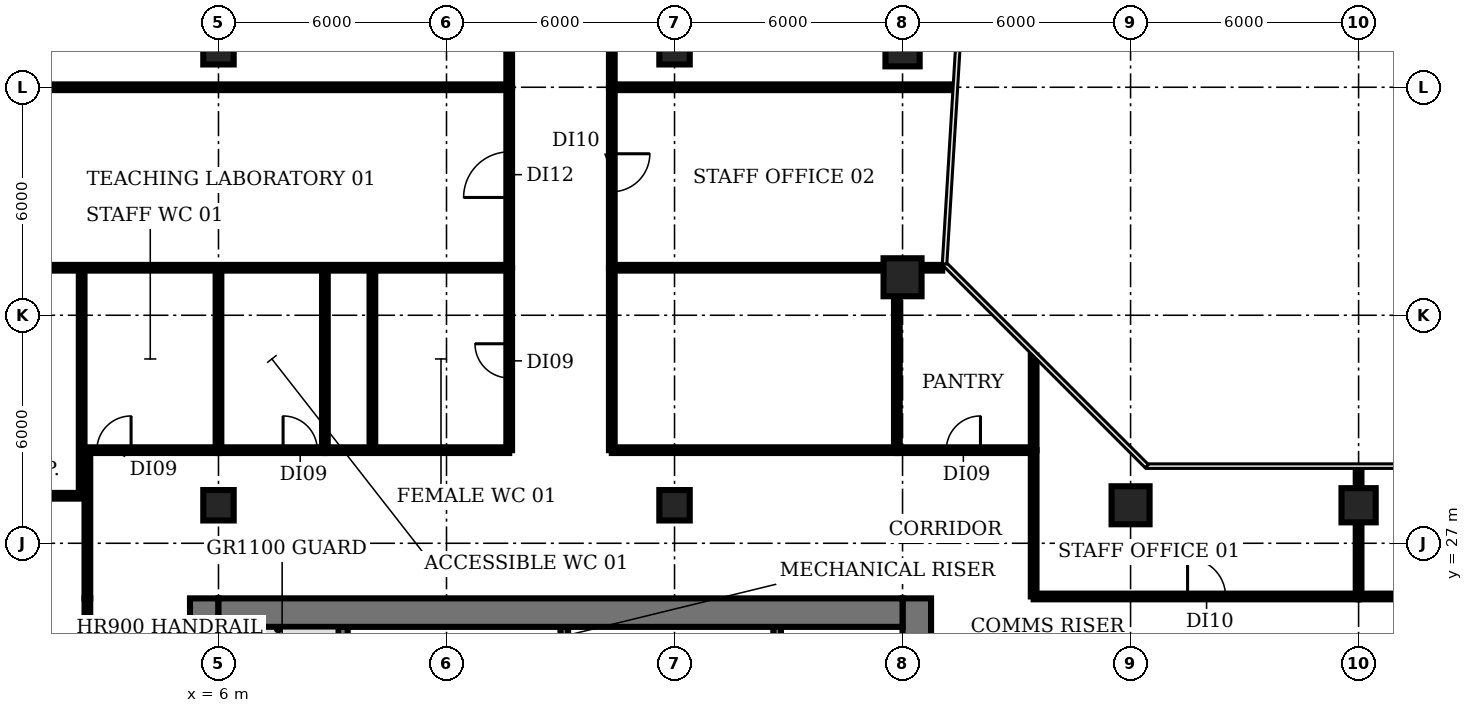
"""IFC4 building model, lengths in metres.
Left out: names, types, materials, properties, quantities, classifications, styles, units other than length and angle.
Written with IfcOpenShell. Run it as: python <this file> out.ifc"""

import sys

from ifc_helpers import new_model, si_unit, direction, frame, frame_2d, origin, origin_2d, place, context, subcontext, project, spatial, rectangle, circle, extrude, element, fill, save


model = new_model("IFC4")
c1 = context("Model", 3, precision=1e-05, world=origin(), true_north=direction((0.0, 1.0)))
c2 = subcontext(c1, "Body", "Model", "MODEL_VIEW")
j1 = project(units=[si_unit("LENGTHUNIT", "METRE"), si_unit("PLANEANGLEUNIT", "RADIAN")], contexts=[c1])
p1 = place(None, origin())
s1 = spatial("IfcSite", under=j1, at=p1, CompositionType="ELEMENT")
p2 = place(p1, origin())
s2 = spatial("IfcBuilding", under=s1, at=p2, CompositionType="ELEMENT")
p3 = place(p2, frame((0.0, 0.0, 125.6)))
s3 = spatial("IfcBuildingStorey", under=s2, at=p3, CompositionType="ELEMENT", Elevation=125.6)
for number, where, z_axis, x_axis in (
    (1, (6.0, 28.0, 0.0), (0.0, 0.0, 1.0), (1.0, 0.0, 0.0)),
    (2, (6.0, 40.0, 0.0), (0.0, 0.0, 1.0), (1.0, 0.0, 0.0)),
    (3, (18.0, 28.0, 0.0), (0.0, 0.0, 1.0), (1.0, 0.0, 0.0)),
    (4, (18.0, 40.0, 0.0), (0.0, 0.0, 1.0), (1.0, 0.0, 0.0)),
):
    element("IfcColumn", number, at=place(p3, frame(where, z_axis=z_axis, x_axis=x_axis)), inside=s3, PredefinedType="COLUMN", context=c2, shape_type="SweptSolid", body=[
        extrude(rectangle(XDim=0.8, YDim=0.8, at=origin_2d()), origin(), (0.0, 0.0, 1.0), 3.85),
    ])
p4 = place(p3, frame((24.0, 34.0, 0.0), z_axis=(0.0, 0.0, 1.0), x_axis=(1.0, 0.0, 0.0)))
e5 = element("IfcColumn", 5, at=p4, inside=s3, PredefinedType="COLUMN", context=c2, shape_type="SweptSolid", body=[
    extrude(circle(Radius=0.5, at=origin_2d()), origin(), (0.0, 0.0, 1.0), 3.85),
])
p5 = place(p3, frame((24.0, 40.0, 0.0), z_axis=(0.0, 0.0, 1.0), x_axis=(1.0, 0.0, 0.0)))
e6 = element("IfcColumn", 6, at=p5, inside=s3, PredefinedType="COLUMN", context=c2, shape_type="SweptSolid", body=[
    extrude(rectangle(XDim=0.9, YDim=0.9, at=origin_2d()), origin(), (0.0, 0.0, 1.0), 3.85),
])
p6 = place(p3, frame((30.0, 28.0, 0.0), z_axis=(0.0, 0.0, 1.0), x_axis=(1.0, 0.0, 0.0)))
e7 = element("IfcColumn", 7, at=p6, inside=s3, PredefinedType="COLUMN", context=c2, shape_type="SweptSolid", body=[
    extrude(circle(Radius=0.5, at=origin_2d()), origin(), (0.0, 0.0, 1.0), 3.85),
])
p7 = place(p3, frame((36.0, 28.0, 0.0), z_axis=(0.0, 0.0, 1.0), x_axis=(1.0, 0.0, 0.0)))
e8 = element("IfcColumn", 8, at=p7, inside=s3, PredefinedType="COLUMN", context=c2, shape_type="SweptSolid", body=[
    extrude(rectangle(XDim=0.9, YDim=0.9, at=origin_2d()), origin(), (0.0, 0.0, 1.0), 3.85),
])
p8 = place(p3, frame((9.275, 18.375, 0.0), z_axis=(0.0, 0.0, 1.0), x_axis=(0.0, 1.0, 0.0)))
e9 = element("IfcWall", 9, at=p8, inside=s3, PredefinedType="SHEAR", context=c2, shape_type="SweptSolid", body=[
    extrude(rectangle(XDim=6.425, YDim=0.25, at=frame_2d((3.212, 0.0))), origin(), (0.0, 0.0, 1.0), 3.85),
])
for number, where, z_axis, x_axis in (
    (10, (15.1, 22.9, 0.0), (0.0, 0.0, 1.0), (0.0, 1.0, 0.0)),
    (11, (20.7, 22.9, 0.0), (0.0, 0.0, 1.0), (0.0, 1.0, 0.0)),
):
    element("IfcWall", number, at=place(p3, frame(where, z_axis=z_axis, x_axis=x_axis)), inside=s3, PredefinedType="SHEAR", context=c2, shape_type="SweptSolid", body=[
        extrude(rectangle(XDim=1.9, YDim=0.2, at=frame_2d((0.95, 0.0))), origin(), (0.0, 0.0, 1.0), 3.85),
    ])
p9 = place(p3, frame((5.625, 4.47, 0.0), z_axis=(0.0, 0.0, 1.0), x_axis=(0.0, 1.0, 0.0)))
e12 = element("IfcWall", 12, at=p9, inside=s3, PredefinedType="SHEAR", context=c2, shape_type="SweptSolid", body=[
    extrude(rectangle(XDim=21.08, YDim=0.75, at=frame_2d((10.54, 0.0))), origin(), (0.0, 0.0, 1.0), 3.85),
])
p10 = place(p9, frame((1.18, 0.0, 0.0)))
e13 = element("IfcOpeningElement", 13, at=p10, cuts=e12, PredefinedType="OPENING", context=c2, shape_type="SweptSolid", body=[
    extrude(rectangle(XDim=1.5, YDim=2.1, at=frame_2d((0.75, 1.05))), frame((0.0, 0.385, 0.0), z_axis=(0.0, -1.0, 0.0), x_axis=(1.0, 0.0, 0.0)), (0.0, 0.0, 1.0), 0.77),
])
p11 = place(p9, frame((7.63, 0.0, 0.0)))
e14 = element("IfcOpeningElement", 14, at=p11, cuts=e12, PredefinedType="OPENING", context=c2, shape_type="SweptSolid", body=[
    extrude(rectangle(XDim=1.2, YDim=2.1, at=frame_2d((0.6, 1.05))), frame((0.0, 0.385, 0.0), z_axis=(0.0, -1.0, 0.0), x_axis=(1.0, 0.0, 0.0)), (0.0, 0.0, 1.0), 0.77),
])
p12 = place(p9, frame((14.18, 0.0, 0.0)))
e15 = element("IfcOpeningElement", 15, at=p12, cuts=e12, PredefinedType="OPENING", context=c2, shape_type="SweptSolid", body=[
    extrude(rectangle(XDim=1.2, YDim=2.1, at=frame_2d((0.6, 1.05))), frame((0.0, 0.385, 0.0), z_axis=(0.0, -1.0, 0.0), x_axis=(1.0, 0.0, 0.0)), (0.0, 0.0, 1.0), 0.77),
])
p13 = place(p3, frame((24.375, 25.55, 0.0), z_axis=(0.0, 0.0, 1.0), x_axis=(0.0, -1.0, 0.0)))
e16 = element("IfcWall", 16, at=p13, inside=s3, PredefinedType="SHEAR", context=c2, shape_type="SweptSolid", body=[
    extrude(rectangle(XDim=21.13, YDim=0.75, at=frame_2d((10.565, 0.0))), origin(), (0.0, 0.0, 1.0), 3.85),
])
p14 = place(p13, frame((18.4, 0.0, 0.0)))
e17 = element("IfcOpeningElement", 17, at=p14, cuts=e16, PredefinedType="OPENING", context=c2, shape_type="SweptSolid", body=[
    extrude(rectangle(XDim=1.5, YDim=2.1, at=frame_2d((0.75, 1.05))), frame((0.0, 0.385, 0.0), z_axis=(0.0, -1.0, 0.0), x_axis=(1.0, 0.0, 0.0)), (0.0, 0.0, 1.0), 0.77),
])
p15 = place(p13, frame((12.3, 0.0, 0.0)))
e18 = element("IfcOpeningElement", 18, at=p15, cuts=e16, PredefinedType="OPENING", context=c2, shape_type="SweptSolid", body=[
    extrude(rectangle(XDim=0.9, YDim=2.1, at=frame_2d((0.45, 1.05))), frame((0.0, 0.385, 0.0), z_axis=(0.0, -1.0, 0.0), x_axis=(1.0, 0.0, 0.0)), (0.0, 0.0, 1.0), 0.77),
])
p16 = place(p13, frame((6.3, 0.0, 0.0)))
e19 = element("IfcOpeningElement", 19, at=p16, cuts=e16, PredefinedType="OPENING", context=c2, shape_type="SweptSolid", body=[
    extrude(rectangle(XDim=2.0, YDim=2.1, at=frame_2d((1.0, 1.05))), frame((0.0, 0.385, 0.0), z_axis=(0.0, -1.0, 0.0), x_axis=(1.0, 0.0, 0.0)), (0.0, 0.0, 1.0), 0.77),
])
p17 = place(p3, frame((6.0, 25.175, 0.0), z_axis=(0.0, 0.0, 1.0), x_axis=(1.0, 0.0, 0.0)))
e20 = element("IfcWall", 20, at=p17, inside=s3, PredefinedType="SHEAR", context=c2, shape_type="SweptSolid", body=[
    extrude(rectangle(XDim=18.0, YDim=0.75, at=frame_2d((9.0, 0.0))), origin(), (0.0, 0.0, 1.0), 3.85),
])
p18 = place(p3, frame((-1.314, 28.25, 0.0), z_axis=(0.0, 0.0, 1.0), x_axis=(1.0, 0.0, 0.0)))
e21 = element("IfcWall", 21, at=p18, inside=s3, PredefinedType="PARTITIONING", context=c2, shape_type="SweptSolid", body=[
    extrude(rectangle(XDim=3.714, YDim=0.15, at=frame_2d((1.857, 0.0))), origin(), (0.0, 0.0, 1.0), 2.83),
])
for number, where, z_axis, x_axis in (
    (22, (-0.98, 34.25, 0.0), (0.0, 0.0, 1.0), (1.0, 0.0, 0.0)),
    (23, (-0.98, 39.0, 0.0), (0.0, 0.0, 1.0), (1.0, 0.0, 0.0)),
):
    element("IfcWall", number, at=place(p3, frame(where, z_axis=z_axis, x_axis=x_axis)), inside=s3, PredefinedType="PARTITIONING", context=c2, shape_type="SweptSolid", body=[
        extrude(rectangle(XDim=14.63, YDim=0.15, at=frame_2d((7.315, 0.0))), origin(), (0.0, 0.0, 1.0), 2.83),
    ])
p19 = place(p3, frame((2.4, 28.25, 0.0), z_axis=(0.0, 0.0, 1.0), x_axis=(0.0, 1.0, 0.0)))
e24 = element("IfcWall", 24, at=p19, inside=s3, PredefinedType="PARTITIONING", context=c2, shape_type="SweptSolid", body=[
    extrude(rectangle(XDim=6.0, YDim=0.15, at=frame_2d((3.0, 0.0))), origin(), (0.0, 0.0, 1.0), 2.83),
])
p20 = place(p3, frame((2.55, 6.1, 0.0), z_axis=(0.0, 0.0, 1.0), x_axis=(0.0, 1.0, 0.0)))
e25 = element("IfcWall", 25, at=p20, inside=s3, PredefinedType="PARTITIONING", context=c2, shape_type="SweptSolid", body=[
    extrude(rectangle(XDim=19.45, YDim=0.15, at=frame_2d((9.725, 0.0))), origin(), (0.0, 0.0, 1.0), 2.83),
])
p21 = place(p20, frame((7.55, 0.0, 0.0)))
e26 = element("IfcOpeningElement", 26, at=p21, cuts=e25, PredefinedType="OPENING", context=c2, shape_type="SweptSolid", body=[
    extrude(rectangle(XDim=1.2, YDim=2.1, at=frame_2d((0.6, 1.05))), frame((0.0, 0.085, 0.0), z_axis=(0.0, -1.0, 0.0), x_axis=(1.0, 0.0, 0.0)), (0.0, 0.0, 1.0), 0.17),
])
p22 = place(p3, frame((2.55, 25.55, 0.0), z_axis=(0.0, 0.0, 1.0), x_axis=(0.0, 1.0, 0.0)))
e27 = element("IfcWall", 27, at=p22, inside=s3, PredefinedType="PARTITIONING", context=c2, shape_type="SweptSolid", body=[
    extrude(rectangle(XDim=3.9, YDim=0.15, at=frame_2d((1.95, 0.0))), origin(), (0.0, 0.0, 1.0), 2.83),
])
p23 = place(p3, frame((2.55, 29.45, 0.0), z_axis=(0.0, 0.0, 1.0), x_axis=(1.0, 0.0, 0.0)))
e28 = element("IfcWall", 28, at=p23, inside=s3, PredefinedType="PARTITIONING", context=c2, shape_type="SweptSolid", body=[
    extrude(rectangle(XDim=3.45, YDim=0.15, at=frame_2d((1.725, 0.0))), origin(), (0.0, 0.0, 1.0), 2.83),
])
p24 = place(p23, frame((0.25, 0.0, 0.0)))
e29 = element("IfcOpeningElement", 29, at=p24, cuts=e28, PredefinedType="OPENING", context=c2, shape_type="SweptSolid", body=[
    extrude(rectangle(XDim=0.9, YDim=2.1, at=frame_2d((0.45, 1.05))), frame((0.0, 0.085, 0.0), z_axis=(0.0, -1.0, 0.0), x_axis=(1.0, 0.0, 0.0)), (0.0, 0.0, 1.0), 0.17),
])
p25 = place(p3, frame((6.0, 29.45, 0.0), z_axis=(0.0, 0.0, 1.0), x_axis=(0.0, 1.0, 0.0)))
e30 = element("IfcWall", 30, at=p25, inside=s3, PredefinedType="PARTITIONING", context=c2, shape_type="SweptSolid", body=[
    extrude(rectangle(XDim=4.8, YDim=0.15, at=frame_2d((2.4, 0.0))), origin(), (0.0, 0.0, 1.0), 2.83),
])
p26 = place(p3, frame((6.0, 29.45, 0.0), z_axis=(0.0, 0.0, 1.0), x_axis=(1.0, 0.0, 0.0)))
e31 = element("IfcWall", 31, at=p26, inside=s3, PredefinedType="PARTITIONING", context=c2, shape_type="SweptSolid", body=[
    extrude(rectangle(XDim=2.8, YDim=0.15, at=frame_2d((1.4, 0.0))), origin(), (0.0, 0.0, 1.0), 2.83),
])
p27 = place(p26, frame((1.7, 0.0, 0.0)))
e32 = element("IfcOpeningElement", 32, at=p27, cuts=e31, PredefinedType="OPENING", context=c2, shape_type="SweptSolid", body=[
    extrude(rectangle(XDim=0.9, YDim=2.1, at=frame_2d((0.45, 1.05))), frame((0.0, 0.085, 0.0), z_axis=(0.0, -1.0, 0.0), x_axis=(1.0, 0.0, 0.0)), (0.0, 0.0, 1.0), 0.17),
])
p28 = place(p3, frame((8.8, 29.45, 0.0), z_axis=(0.0, 0.0, 1.0), x_axis=(0.0, 1.0, 0.0)))
e33 = element("IfcWall", 33, at=p28, inside=s3, PredefinedType="PARTITIONING", context=c2, shape_type="SweptSolid", body=[
    extrude(rectangle(XDim=4.8, YDim=0.15, at=frame_2d((2.4, 0.0))), origin(), (0.0, 0.0, 1.0), 2.83),
])
p29 = place(p3, frame((8.8, 29.45, 0.0), z_axis=(0.0, 0.0, 1.0), x_axis=(1.0, 0.0, 0.0)))
e34 = element("IfcWall", 34, at=p29, inside=s3, PredefinedType="PARTITIONING", context=c2, shape_type="SweptSolid", body=[
    extrude(rectangle(XDim=4.85, YDim=0.15, at=frame_2d((2.425, 0.0))), origin(), (0.0, 0.0, 1.0), 2.83),
])
p30 = place(p3, frame((10.05, 29.45, 0.0), z_axis=(0.0, 0.0, 1.0), x_axis=(0.0, 1.0, 0.0)))
e35 = element("IfcWall", 35, at=p30, inside=s3, PredefinedType="PARTITIONING", context=c2, shape_type="SweptSolid", body=[
    extrude(rectangle(XDim=4.8, YDim=0.15, at=frame_2d((2.4, 0.0))), origin(), (0.0, 0.0, 1.0), 2.83),
])
p31 = place(p3, frame((13.65, 29.45, 0.0), z_axis=(0.0, 0.0, 1.0), x_axis=(0.0, 1.0, 0.0)))
e36 = element("IfcWall", 36, at=p31, inside=s3, PredefinedType="PARTITIONING", context=c2, shape_type="SweptSolid", body=[
    extrude(rectangle(XDim=4.8, YDim=0.15, at=frame_2d((2.4, 0.0))), origin(), (0.0, 0.0, 1.0), 2.83),
])
p32 = place(p31, frame((1.9, 0.0, 0.0)))
e37 = element("IfcOpeningElement", 37, at=p32, cuts=e36, PredefinedType="OPENING", context=c2, shape_type="SweptSolid", body=[
    extrude(rectangle(XDim=0.9, YDim=2.1, at=frame_2d((0.45, 1.05))), frame((0.0, 0.085, 0.0), z_axis=(0.0, -1.0, 0.0), x_axis=(1.0, 0.0, 0.0)), (0.0, 0.0, 1.0), 0.17),
])
p33 = place(p3, frame((13.65, 34.25, 0.0), z_axis=(0.0, 0.0, 1.0), x_axis=(0.0, 1.0, 0.0)))
e38 = element("IfcWall", 38, at=p33, inside=s3, PredefinedType="PARTITIONING", context=c2, shape_type="SweptSolid", body=[
    extrude(rectangle(XDim=4.75, YDim=0.15, at=frame_2d((2.375, 0.0))), origin(), (0.0, 0.0, 1.0), 2.83),
])
p34 = place(p33, frame((1.85, 0.0, 0.0)))
e39 = element("IfcOpeningElement", 39, at=p34, cuts=e38, PredefinedType="OPENING", context=c2, shape_type="SweptSolid", body=[
    extrude(rectangle(XDim=1.2, YDim=2.1, at=frame_2d((0.6, 1.05))), frame((0.0, 0.085, 0.0), z_axis=(0.0, -1.0, 0.0), x_axis=(1.0, 0.0, 0.0)), (0.0, 0.0, 1.0), 0.17),
])
p35 = place(p3, frame((13.65, 39.0, 0.0), z_axis=(0.0, 0.0, 1.0), x_axis=(0.0, 1.0, 0.0)))
e40 = element("IfcWall", 40, at=p35, inside=s3, PredefinedType="PARTITIONING", context=c2, shape_type="SweptSolid", body=[
    extrude(rectangle(XDim=6.0, YDim=0.15, at=frame_2d((3.0, 0.0))), origin(), (0.0, 0.0, 1.0), 2.83),
])
p36 = place(p35, frame((2.4, 0.0, 0.0)))
e41 = element("IfcOpeningElement", 41, at=p36, cuts=e40, PredefinedType="OPENING", context=c2, shape_type="SweptSolid", body=[
    extrude(rectangle(XDim=1.0, YDim=2.1, at=frame_2d((0.5, 1.05))), frame((0.0, 0.085, 0.0), z_axis=(0.0, -1.0, 0.0), x_axis=(1.0, 0.0, 0.0)), (0.0, 0.0, 1.0), 0.17),
])
p37 = place(p3, frame((16.35, 29.45, 0.0), z_axis=(0.0, 0.0, 1.0), x_axis=(0.0, 1.0, 0.0)))
e42 = element("IfcWall", 42, at=p37, inside=s3, PredefinedType="PARTITIONING", context=c2, shape_type="SweptSolid", body=[
    extrude(rectangle(XDim=4.8, YDim=0.15, at=frame_2d((2.4, 0.0))), origin(), (0.0, 0.0, 1.0), 2.83),
])
p38 = place(p3, frame((16.35, 29.45, 0.0), z_axis=(0.0, 0.0, 1.0), x_axis=(1.0, 0.0, 0.0)))
e43 = element("IfcWall", 43, at=p38, inside=s3, PredefinedType="PARTITIONING", context=c2, shape_type="SweptSolid", body=[
    extrude(rectangle(XDim=7.5, YDim=0.15, at=frame_2d((3.75, 0.0))), origin(), (0.0, 0.0, 1.0), 2.83),
])
p39 = place(p3, frame((16.35, 34.25, 0.0), z_axis=(0.0, 0.0, 1.0), x_axis=(1.0, 0.0, 0.0)))
e44 = element("IfcWall", 44, at=p39, inside=s3, PredefinedType="PARTITIONING", context=c2, shape_type="SweptSolid", body=[
    extrude(rectangle(XDim=8.693, YDim=0.15, at=frame_2d((4.346, 0.0))), origin(), (0.0, 0.0, 1.0), 2.83),
])
p40 = place(p3, frame((16.35, 39.0, 0.0), z_axis=(0.0, 0.0, 1.0), x_axis=(0.0, -1.0, 0.0)))
e45 = element("IfcWall", 45, at=p40, inside=s3, PredefinedType="PARTITIONING", context=c2, shape_type="SweptSolid", body=[
    extrude(rectangle(XDim=4.75, YDim=0.15, at=frame_2d((2.375, 0.0))), origin(), (0.0, 0.0, 1.0), 2.83),
])
p41 = place(p40, frame((1.75, 0.0, 0.0)))
e46 = element("IfcOpeningElement", 46, at=p41, cuts=e45, PredefinedType="OPENING", context=c2, shape_type="SweptSolid", body=[
    extrude(rectangle(XDim=1.0, YDim=2.1, at=frame_2d((0.5, 1.05))), frame((0.0, 0.085, 0.0), z_axis=(0.0, -1.0, 0.0), x_axis=(1.0, 0.0, 0.0)), (0.0, 0.0, 1.0), 0.17),
])
p42 = place(p3, frame((16.35, 39.0, 0.0), z_axis=(0.0, 0.0, 1.0), x_axis=(1.0, 0.0, 0.0)))
e47 = element("IfcWall", 47, at=p42, inside=s3, PredefinedType="PARTITIONING", context=c2, shape_type="SweptSolid", body=[
    extrude(rectangle(XDim=8.99, YDim=0.15, at=frame_2d((4.495, 0.0))), origin(), (0.0, 0.0, 1.0), 2.83),
])
p43 = place(p3, frame((16.35, 57.0, 0.0), z_axis=(0.0, 0.0, 1.0), x_axis=(0.0, -1.0, 0.0)))
e48 = element("IfcWall", 48, at=p43, inside=s3, PredefinedType="PARTITIONING", context=c2, shape_type="SweptSolid", body=[
    extrude(rectangle(XDim=18.0, YDim=0.15, at=frame_2d((9.0, 0.0))), origin(), (0.0, 0.0, 1.0), 2.83),
])
p44 = place(p43, frame((8.5, 0.0, 0.0)))
e49 = element("IfcOpeningElement", 49, at=p44, cuts=e48, PredefinedType="OPENING", context=c2, shape_type="SweptSolid", body=[
    extrude(rectangle(XDim=1.2, YDim=2.1, at=frame_2d((0.6, 1.05))), frame((0.0, 0.085, 0.0), z_axis=(0.0, -1.0, 0.0), x_axis=(1.0, 0.0, 0.0)), (0.0, 0.0, 1.0), 0.17),
])
p45 = place(p3, frame((23.85, 29.45, 0.0), z_axis=(0.0, 0.0, 1.0), x_axis=(0.0, 1.0, 0.0)))
e50 = element("IfcWall", 50, at=p45, inside=s3, PredefinedType="PARTITIONING", context=c2, shape_type="SweptSolid", body=[
    extrude(rectangle(XDim=4.8, YDim=0.15, at=frame_2d((2.4, 0.0))), origin(), (0.0, 0.0, 1.0), 2.83),
])
p46 = place(p3, frame((23.85, 29.45, 0.0), z_axis=(0.0, 0.0, 1.0), x_axis=(1.0, 0.0, 0.0)))
e51 = element("IfcWall", 51, at=p46, inside=s3, PredefinedType="PARTITIONING", context=c2, shape_type="SweptSolid", body=[
    extrude(rectangle(XDim=3.6, YDim=0.15, at=frame_2d((1.8, 0.0))), origin(), (0.0, 0.0, 1.0), 2.83),
])
p47 = place(p46, frame((1.3, 0.0, 0.0)))
e52 = element("IfcOpeningElement", 52, at=p47, cuts=e51, PredefinedType="OPENING", context=c2, shape_type="SweptSolid", body=[
    extrude(rectangle(XDim=0.9, YDim=2.1, at=frame_2d((0.45, 1.05))), frame((0.0, 0.085, 0.0), z_axis=(0.0, -1.0, 0.0), x_axis=(1.0, 0.0, 0.0)), (0.0, 0.0, 1.0), 0.17),
])
p48 = place(p3, frame((27.45, 25.6, 0.0), z_axis=(0.0, 0.0, 1.0), x_axis=(0.0, 1.0, 0.0)))
e53 = element("IfcWall", 53, at=p48, inside=s3, PredefinedType="PARTITIONING", context=c2, shape_type="SweptSolid", body=[
    extrude(rectangle(XDim=3.85, YDim=0.15, at=frame_2d((1.925, 0.0))), origin(), (0.0, 0.0, 1.0), 2.83),
])
p49 = place(p3, frame((27.45, 25.6, 0.0), z_axis=(0.0, 0.0, 1.0), x_axis=(1.0, 0.0, 0.0)))
e54 = element("IfcWall", 54, at=p49, inside=s3, PredefinedType="PARTITIONING", context=c2, shape_type="SweptSolid", body=[
    extrude(rectangle(XDim=8.55, YDim=0.15, at=frame_2d((4.275, 0.0))), origin(), (0.0, 0.0, 1.0), 2.83),
])
p50 = place(p49, frame((4.05, 0.0, 0.0)))
e55 = element("IfcOpeningElement", 55, at=p50, cuts=e54, PredefinedType="OPENING", context=c2, shape_type="SweptSolid", body=[
    extrude(rectangle(XDim=1.0, YDim=2.1, at=frame_2d((0.5, 1.05))), frame((0.0, 0.085, 0.0), z_axis=(0.0, -1.0, 0.0), x_axis=(1.0, 0.0, 0.0)), (0.0, 0.0, 1.0), 0.17),
])
p51 = place(p3, frame((27.45, 29.45, 0.0), z_axis=(0.0, 0.0, 1.0), x_axis=(0.0, 1.0, 0.0)))
e56 = element("IfcWall", 56, at=p51, inside=s3, PredefinedType="PARTITIONING", context=c2, shape_type="SweptSolid", body=[
    extrude(rectangle(XDim=2.49, YDim=0.15, at=frame_2d((1.245, 0.0))), origin(), (0.0, 0.0, 1.0), 2.83),
])
p52 = place(p3, frame((36.0, 25.6, 0.0), z_axis=(0.0, 0.0, 1.0), x_axis=(0.0, 1.0, 0.0)))
e57 = element("IfcWall", 57, at=p52, inside=s3, PredefinedType="PARTITIONING", context=c2, shape_type="SweptSolid", body=[
    extrude(rectangle(XDim=3.38, YDim=0.15, at=frame_2d((1.69, 0.0))), origin(), (0.0, 0.0, 1.0), 2.83),
])
p53 = place(p3, frame((36.0, 25.6, 0.0), z_axis=(0.0, 0.0, 1.0), x_axis=(1.0, 0.0, 0.0)))
e58 = element("IfcWall", 58, at=p53, inside=s3, PredefinedType="PARTITIONING", context=c2, shape_type="SweptSolid", body=[
    extrude(rectangle(XDim=6.0, YDim=0.15, at=frame_2d((3.0, 0.0))), origin(), (0.0, 0.0, 1.0), 2.83),
])
p54 = place(p53, frame((2.5, 0.0, 0.0)))
e59 = element("IfcOpeningElement", 59, at=p54, cuts=e58, PredefinedType="OPENING", context=c2, shape_type="SweptSolid", body=[
    extrude(rectangle(XDim=1.2, YDim=2.1, at=frame_2d((0.6, 1.05))), frame((0.0, 0.085, 0.0), z_axis=(0.0, -1.0, 0.0), x_axis=(1.0, 0.0, 0.0)), (0.0, 0.0, 1.0), 0.17),
])
p55 = place(p24, origin())
e60 = element("IfcDoor", 60, at=p55, inside=s3, OperationType="SINGLE_SWING_RIGHT", PredefinedType="DOOR", context=c2, shape_type="SweptSolid", body=[
    extrude(rectangle(XDim=0.9, YDim=2.1, at=frame_2d((0.45, 1.05))), frame((0.0, 0.025, 0.0), z_axis=(0.0, -1.0, 0.0), x_axis=(1.0, 0.0, 0.0)), (0.0, 0.0, 1.0), 0.05),
])
fill(e29, e60)
p56 = place(p27, origin())
e61 = element("IfcDoor", 61, at=p56, inside=s3, OperationType="SINGLE_SWING_LEFT", PredefinedType="DOOR", context=c2, shape_type="SweptSolid", body=[
    extrude(rectangle(XDim=0.9, YDim=2.1, at=frame_2d((0.45, 1.05))), frame((0.0, 0.025, 0.0), z_axis=(0.0, -1.0, 0.0), x_axis=(1.0, 0.0, 0.0)), (0.0, 0.0, 1.0), 0.05),
])
fill(e32, e61)
p57 = place(p32, origin())
e62 = element("IfcDoor", 62, at=p57, inside=s3, OperationType="SINGLE_SWING_RIGHT", PredefinedType="DOOR", context=c2, shape_type="SweptSolid", body=[
    extrude(rectangle(XDim=0.9, YDim=2.1, at=frame_2d((0.45, 1.05))), frame((0.0, 0.025, 0.0), z_axis=(0.0, -1.0, 0.0), x_axis=(1.0, 0.0, 0.0)), (0.0, 0.0, 1.0), 0.05),
])
fill(e37, e62)
p58 = place(p34, origin())
e63 = element("IfcDoor", 63, at=p58, inside=s3, OperationType="SINGLE_SWING_LEFT", PredefinedType="DOOR", context=c2, shape_type="SweptSolid", body=[
    extrude(rectangle(XDim=1.2, YDim=2.1, at=frame_2d((0.6, 1.05))), frame((0.0, 0.025, 0.0), z_axis=(0.0, -1.0, 0.0), x_axis=(1.0, 0.0, 0.0)), (0.0, 0.0, 1.0), 0.05),
])
fill(e39, e63)
p59 = place(p41, origin())
e64 = element("IfcDoor", 64, at=p59, inside=s3, OperationType="SINGLE_SWING_LEFT", PredefinedType="DOOR", context=c2, shape_type="SweptSolid", body=[
    extrude(rectangle(XDim=1.0, YDim=2.1, at=frame_2d((0.5, 1.05))), frame((0.0, 0.025, 0.0), z_axis=(0.0, -1.0, 0.0), x_axis=(1.0, 0.0, 0.0)), (0.0, 0.0, 1.0), 0.05),
])
fill(e46, e64)
p60 = place(p47, origin())
e65 = element("IfcDoor", 65, at=p60, inside=s3, OperationType="SINGLE_SWING_RIGHT", PredefinedType="DOOR", context=c2, shape_type="SweptSolid", body=[
    extrude(rectangle(XDim=0.9, YDim=2.1, at=frame_2d((0.45, 1.05))), frame((0.0, 0.025, 0.0), z_axis=(0.0, -1.0, 0.0), x_axis=(1.0, 0.0, 0.0)), (0.0, 0.0, 1.0), 0.05),
])
fill(e52, e65)
p61 = place(p50, origin())
e66 = element("IfcDoor", 66, at=p61, inside=s3, OperationType="SINGLE_SWING_LEFT", PredefinedType="DOOR", context=c2, shape_type="SweptSolid", body=[
    extrude(rectangle(XDim=1.0, YDim=2.1, at=frame_2d((0.5, 1.05))), frame((0.0, 0.025, 0.0), z_axis=(0.0, -1.0, 0.0), x_axis=(1.0, 0.0, 0.0)), (0.0, 0.0, 1.0), 0.05),
])
fill(e55, e66)
save(model, sys.argv[1])
